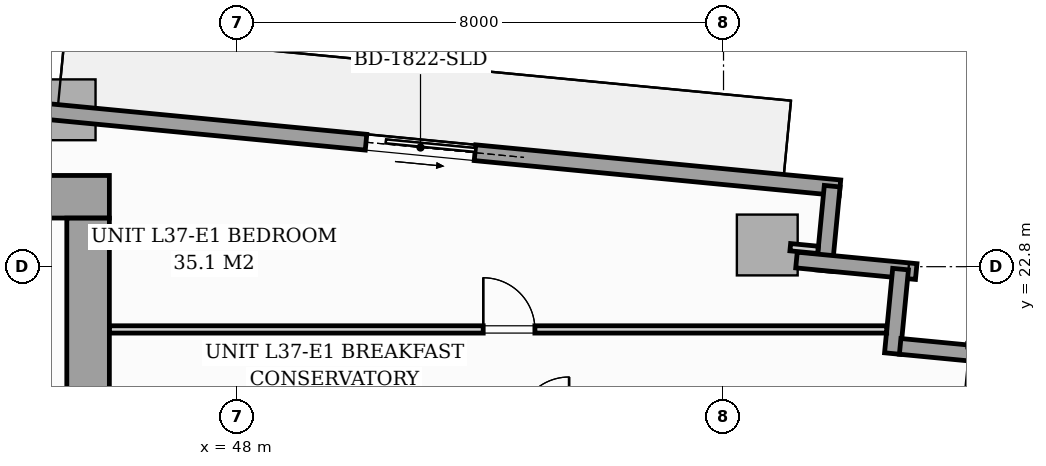
"""IFC4 building model, lengths in metres.
Left out: names, types, materials, properties, quantities, classifications, styles, units other than length and angle.
Written with IfcOpenShell. Run it as: python <this file> out.ifc"""

import sys

from ifc_helpers import new_model, si_unit, direction, frame, frame_2d, origin, origin_2d, place, context, subcontext, project, spatial, rectangle, i_section, extrude, source, transform, mapped, element, fill, save


model = new_model("IFC4")
c1 = context("Model", 3, precision=1e-05, world=origin(), true_north=direction((0.0, 1.0)))
c2 = subcontext(c1, "Body", "Model", "MODEL_VIEW")
j1 = project(units=[si_unit("LENGTHUNIT", "METRE"), si_unit("PLANEANGLEUNIT", "RADIAN")], contexts=[c1])
p1 = place(None, origin())
s1 = spatial("IfcSite", under=j1, at=p1, CompositionType="ELEMENT")
p2 = place(p1, origin())
s2 = spatial("IfcBuilding", under=s1, at=p2, CompositionType="ELEMENT")
p3 = place(p2, frame((0.0, 0.0, 131.0)))
s3 = spatial("IfcBuildingStorey", under=s2, at=p3, CompositionType="ELEMENT", Elevation=131.0)
m1 = source(origin(), c2, "Body", "SweptSolid", [
    extrude(i_section(OverallWidth=0.421, OverallDepth=0.465, WebThickness=0.045, FlangeThickness=0.073, FilletRadius=0.018, at=origin_2d()), origin(), (0.0, 0.0, 1.0), 3.196),
])
p4 = place(p3, frame((45.6, 24.0, 0.002), z_axis=(0.0, 0.0, 1.0), x_axis=(1.0, 0.0, 0.0)))
e1 = element("IfcColumn", 1, at=p4, inside=s3, PredefinedType="PILASTER", context=c2, shape_type="MappedRepresentation", body=[
    mapped(m1, transform((0.0, 0.0, 0.0), scale=1.0)),
])
m2 = source(origin(), c2, "Body", "SweptSolid", [
    extrude(rectangle(XDim=1.0, YDim=1.0, at=origin_2d()), origin(), (0.0, 0.0, 1.0), 3.196),
])
for number, where, z_axis, x_axis in (
    (2, (45.173, 25.38, 0.002), (0.0, 0.0, 1.0), (0.995, -0.096, 0.0)),
    (3, (56.719, 23.157, 0.002), (0.0, 0.0, 1.0), (0.995, -0.096, 0.0)),
):
    element("IfcColumn", number, at=place(p3, frame(where, z_axis=z_axis, x_axis=x_axis)), inside=s3, PredefinedType="COLUMN", context=c2, shape_type="MappedRepresentation", body=[
        mapped(m2, transform((0.0, 0.0, 0.0), scale=1.0)),
    ])
p5 = place(p3, frame((40.983, 25.727, 0.0), z_axis=(0.0, 0.0, 1.0), x_axis=(0.995395844771, -0.095849424686, 0.0)))
e4 = element("IfcWall", 4, at=p5, inside=s3, PredefinedType="STANDARD", context=c2, shape_type="SweptSolid", body=[
    extrude(rectangle(XDim=17.01, YDim=0.26, at=frame_2d((8.505, 0.0))), origin(), (0.0, 0.0, 1.0), 2.94),
])
p6 = place(p5, frame((9.18, 0.0, 0.0)))
e5 = element("IfcOpeningElement", 5, at=p6, cuts=e4, PredefinedType="OPENING", context=c2, shape_type="SweptSolid", body=[
    extrude(rectangle(XDim=1.8, YDim=2.06, at=frame_2d((0.9, 1.03))), frame((0.0, 0.14, 0.0), z_axis=(0.0, -1.0, 0.0), x_axis=(1.0, 0.0, 0.0)), (0.0, 0.0, 1.0), 0.28),
])
p7 = place(p5, frame((0.7, 0.0, 0.65)))
e6 = element("IfcOpeningElement", 6, at=p7, cuts=e4, PredefinedType="OPENING", context=c2, shape_type="SweptSolid", body=[
    extrude(rectangle(XDim=1.6, YDim=1.5, at=frame_2d((0.8, 0.75))), frame((0.0, 0.14, 0.0), z_axis=(0.0, -1.0, 0.0), x_axis=(1.0, 0.0, 0.0)), (0.0, 0.0, 1.0), 0.28),
])
p8 = place(p3, frame((57.787, 24.124, 0.0), z_axis=(0.0, 0.0, 1.0), x_axis=(-0.095915846097, -0.995389446633, 0.0)))
e7 = element("IfcWall", 7, at=p8, inside=s3, PredefinedType="STANDARD", context=c2, shape_type="SweptSolid", body=[
    extrude(rectangle(XDim=1.395, YDim=0.26, at=frame_2d((0.697, 0.0))), origin(), (0.0, 0.0, 1.0), 2.94),
])
p9 = place(p3, frame((57.2, 22.909, 0.0), z_axis=(0.0, 0.0, 1.0), x_axis=(0.995401789159, -0.095787672171, 0.0)))
e8 = element("IfcWall", 8, at=p9, inside=s3, PredefinedType="STANDARD", context=c2, shape_type="SweptSolid", body=[
    extrude(rectangle(XDim=1.978, YDim=0.26, at=frame_2d((0.989, 0.0))), origin(), (0.0, 0.0, 1.0), 2.94),
])
for number, where, z_axis, x_axis in (
    (9, (58.912, 22.76, 0.0), (0.0, 0.0, 1.0), (-0.096, -0.995, 0.0)),
    (10, (58.905, 21.49, 0.0), (0.0, 0.0, 1.0), (0.995, -0.096, 0.0)),
):
    element("IfcWall", number, at=place(p3, frame(where, z_axis=z_axis, x_axis=x_axis)), inside=s3, PredefinedType="STANDARD", context=c2, shape_type="SweptSolid", body=[
        extrude(rectangle(XDim=1.395, YDim=0.26, at=frame_2d((0.698, 0.0))), origin(), (0.0, 0.0, 1.0), 2.94),
    ])
p10 = place(p3, frame((26.1, 23.95, 0.0), z_axis=(0.0, 0.0, 1.0), x_axis=(1.0, 0.0, 0.0)))
e11 = element("IfcWall", 11, at=p10, inside=s3, PredefinedType="SHEAR", context=c2, shape_type="SweptSolid", body=[
    extrude(rectangle(XDim=19.8, YDim=0.7, at=frame_2d((9.9, 0.0))), origin(), (0.0, 0.0, 1.0), 3.2),
])
p11 = place(p3, frame((45.55, 17.802, 0.0), z_axis=(0.0, 0.0, 1.0), x_axis=(0.0, 1.0, 0.0)))
e12 = element("IfcWall", 12, at=p11, inside=s3, PredefinedType="SHEAR", context=c2, shape_type="SweptSolid", body=[
    extrude(rectangle(XDim=5.796, YDim=0.7, at=frame_2d((2.898, 0.0))), origin(), (0.0, 0.0, 1.0), 3.2),
])
p12 = place(p3, frame((45.902, 21.768, 0.0), z_axis=(0.0, 0.0, 1.0), x_axis=(1.0, 0.0, 0.0)))
e13 = element("IfcWall", 13, at=p12, inside=s3, PredefinedType="PARTITIONING", context=c2, shape_type="SweptSolid", body=[
    extrude(rectangle(XDim=12.781, YDim=0.12, at=frame_2d((6.391, 0.0))), origin(), (0.0, 0.0, 1.0), 2.94),
])
p13 = place(p12, frame((6.146, 0.0, 0.0)))
e14 = element("IfcOpeningElement", 14, at=p13, cuts=e13, PredefinedType="OPENING", context=c2, shape_type="SweptSolid", body=[
    extrude(rectangle(XDim=0.85, YDim=2.05, at=frame_2d((0.425, 1.025))), frame((0.0, 0.07, 0.0), z_axis=(0.0, -1.0, 0.0), x_axis=(1.0, 0.0, 0.0)), (0.0, 0.0, 1.0), 0.14),
])
p14 = place(p3, frame((57.098, 23.12, 0.0), z_axis=(0.0, 0.0, 1.0), x_axis=(0.995384576284, -0.09596637586, 0.0)))
e15 = element("IfcWall", 15, at=p14, inside=s3, PredefinedType="PARTITIONING", context=c2, shape_type="SweptSolid", body=[
    extrude(rectangle(XDim=0.458, YDim=0.12, at=frame_2d((0.229, 0.0))), origin(), (0.0, 0.0, 1.0), 2.94),
])
m3 = source(origin(), c2, "Body", "SweptSolid", [
    extrude(rectangle(XDim=1.8, YDim=2.06, at=frame_2d((0.9, 1.03))), frame((0.0, 0.025, 0.0), z_axis=(0.0, -1.0, 0.0), x_axis=(1.0, 0.0, 0.0)), (0.0, 0.0, 1.0), 0.05),
])
p15 = place(p6, origin())
e16 = element("IfcDoor", 16, at=p15, inside=s3, OperationType="SLIDING_TO_RIGHT", PredefinedType="DOOR", context=c2, shape_type="MappedRepresentation", body=[
    mapped(m3, transform((0.0, 0.0, 0.0), scale=1.0)),
])
fill(e5, e16)
m4 = source(origin(), c2, "Body", "SweptSolid", [
    extrude(rectangle(XDim=0.85, YDim=2.05, at=frame_2d((0.425, 1.025))), frame((0.0, 0.025, 0.0), z_axis=(0.0, -1.0, 0.0), x_axis=(1.0, 0.0, 0.0)), (0.0, 0.0, 1.0), 0.05),
])
p16 = place(p13, origin())
e17 = element("IfcDoor", 17, at=p16, inside=s3, OperationType="SINGLE_SWING_LEFT", PredefinedType="DOOR", context=c2, shape_type="MappedRepresentation", body=[
    mapped(m4, transform((0.0, 0.0, 0.0), scale=1.0)),
])
fill(e14, e17)
save(model, sys.argv[1])
